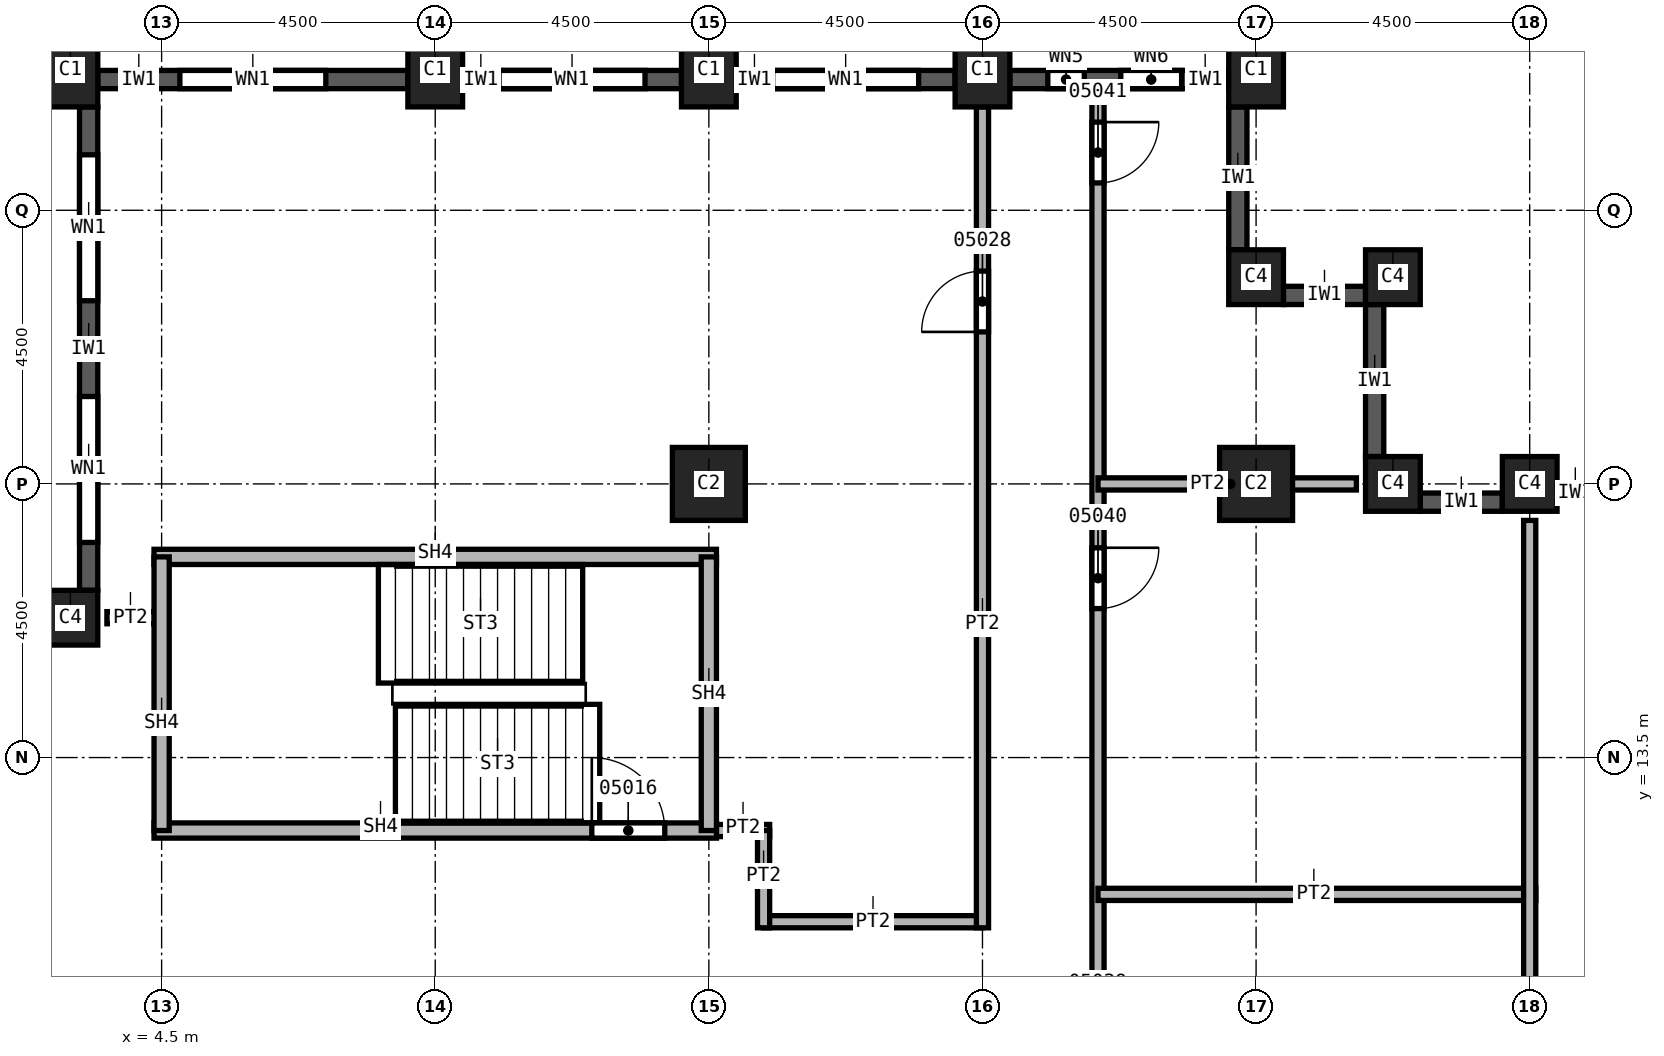
"""IFC4 building model, lengths in metres.
Left out: names, types, materials, properties, quantities, classifications, styles, units other than length and angle.
Written with IfcOpenShell. Run it as: python <this file> out.ifc"""

import sys

from ifc_helpers import new_model, si_unit, direction, frame, frame_2d, origin, origin_2d, place, context, subcontext, project, spatial, rectangle, extrude, element, fill, save


model = new_model("IFC4")
c1 = context("Model", 3, precision=1e-05, world=origin(), true_north=direction((0.0, 1.0)))
c2 = subcontext(c1, "Body", "Model", "MODEL_VIEW")
j1 = project(units=[si_unit("LENGTHUNIT", "METRE"), si_unit("PLANEANGLEUNIT", "RADIAN")], contexts=[c1])
p1 = place(None, origin())
s1 = spatial("IfcSite", under=j1, at=p1, CompositionType="ELEMENT")
p2 = place(p1, origin())
s2 = spatial("IfcBuilding", under=s1, at=p2, CompositionType="ELEMENT")
p3 = place(p2, frame((0.0, 0.0, 112.0)))
s3 = spatial("IfcBuildingStorey", under=s2, at=p3, CompositionType="ELEMENT", Elevation=112.0)
for number, where, z_axis, x_axis in (
    (1, (13.5, 18.0, 0.0), (0.0, 0.0, 1.0), (1.0, 0.0, 0.0)),
    (2, (22.5, 18.0, 0.0), (0.0, 0.0, 1.0), (1.0, 0.0, 0.0)),
):
    element("IfcColumn", number, at=place(p3, frame(where, z_axis=z_axis, x_axis=x_axis)), inside=s3, PredefinedType="COLUMN", context=c2, shape_type="SweptSolid", body=[
        extrude(rectangle(XDim=1.2, YDim=1.2, at=origin_2d()), origin(), (0.0, 0.0, 1.0), 3.7),
    ])
p4 = place(p3, frame((27.0, 18.0, 0.0), z_axis=(0.0, 0.0, 1.0), x_axis=(1.0, 0.0, 0.0)))
e3 = element("IfcColumn", 3, at=p4, inside=s3, PredefinedType="COLUMN", context=c2, shape_type="SweptSolid", body=[
    extrude(rectangle(XDim=0.9, YDim=0.9, at=origin_2d()), origin(), (0.0, 0.0, 1.0), 3.7),
])
for number, where, z_axis, x_axis in (
    (4, (3.0, 24.8, 0.0), (0.0, 0.0, 1.0), (1.0, 0.0, 0.0)),
    (5, (9.0, 24.8, 0.0), (0.0, 0.0, 1.0), (1.0, 0.0, 0.0)),
    (6, (13.5, 24.8, 0.0), (0.0, 0.0, 1.0), (1.0, 0.0, 0.0)),
    (7, (18.0, 24.8, 0.0), (0.0, 0.0, 1.0), (1.0, 0.0, 0.0)),
    (8, (22.5, 24.8, 0.0), (0.0, 0.0, 1.0), (1.0, 0.0, 0.0)),
):
    element("IfcColumn", number, at=place(p3, frame(where, z_axis=z_axis, x_axis=x_axis)), inside=s3, PredefinedType="COLUMN", context=c2, shape_type="SweptSolid", body=[
        extrude(rectangle(XDim=0.9, YDim=1.2, at=origin_2d()), origin(), (0.0, 0.0, 1.0), 3.7),
    ])
for number, where, z_axis, x_axis in (
    (9, (3.0, 15.8, 0.0), (0.0, 0.0, 1.0), (1.0, 0.0, 0.0)),
    (10, (22.5, 21.4, 0.0), (0.0, 0.0, 1.0), (1.0, 0.0, 0.0)),
    (11, (24.75, 21.4, 0.0), (0.0, 0.0, 1.0), (1.0, 0.0, 0.0)),
    (12, (24.75, 18.0, 0.0), (0.0, 0.0, 1.0), (1.0, 0.0, 0.0)),
):
    element("IfcColumn", number, at=place(p3, frame(where, z_axis=z_axis, x_axis=x_axis)), inside=s3, PredefinedType="COLUMN", context=c2, shape_type="SweptSolid", body=[
        extrude(rectangle(XDim=0.9, YDim=0.9, at=origin_2d()), origin(), (0.0, 0.0, 1.0), 3.7),
    ])
p5 = place(p3, frame((31.05, 17.85, 0.0), z_axis=(0.0, 0.0, 1.0), x_axis=(-1.0, 0.0, 0.0)))
e13 = element("IfcWall", 13, at=p5, inside=s3, PredefinedType="SOLIDWALL", context=c2, shape_type="SweptSolid", body=[
    extrude(rectangle(XDim=3.6, YDim=0.3, at=frame_2d((1.8, 0.0))), origin(), (0.0, 0.0, 1.0), 3.1),
])
p6 = place(p5, frame((0.6, 0.0, 0.8)))
e14 = element("IfcOpeningElement", 14, at=p6, cuts=e13, PredefinedType="OPENING", context=c2, shape_type="SweptSolid", body=[
    extrude(rectangle(XDim=2.4, YDim=1.95, at=frame_2d((1.2, 0.975))), frame((0.0, 0.15, 0.0), z_axis=(0.0, -1.0, 0.0), x_axis=(1.0, 0.0, 0.0)), (0.0, 0.0, 1.0), 0.3),
])
p7 = place(p3, frame((26.55, 17.7, 0.0), z_axis=(0.0, 0.0, 1.0), x_axis=(-1.0, 0.0, 0.0)))
e15 = element("IfcWall", 15, at=p7, inside=s3, PredefinedType="SOLIDWALL", context=c2, shape_type="SweptSolid", body=[
    extrude(rectangle(XDim=1.35, YDim=0.3, at=frame_2d((0.675, 0.0))), origin(), (0.0, 0.0, 1.0), 3.1),
])
p8 = place(p3, frame((24.45, 18.45, 0.0), z_axis=(0.0, 0.0, 1.0), x_axis=(0.0, 1.0, 0.0)))
e16 = element("IfcWall", 16, at=p8, inside=s3, PredefinedType="SOLIDWALL", context=c2, shape_type="SweptSolid", body=[
    extrude(rectangle(XDim=2.5, YDim=0.3, at=frame_2d((1.25, 0.0))), origin(), (0.0, 0.0, 1.0), 3.1),
])
p9 = place(p3, frame((24.3, 21.1, 0.0), z_axis=(0.0, 0.0, 1.0), x_axis=(-1.0, 0.0, 0.0)))
e17 = element("IfcWall", 17, at=p9, inside=s3, PredefinedType="SOLIDWALL", context=c2, shape_type="SweptSolid", body=[
    extrude(rectangle(XDim=1.35, YDim=0.3, at=frame_2d((0.675, 0.0))), origin(), (0.0, 0.0, 1.0), 3.1),
])
p10 = place(p3, frame((22.2, 21.85, 0.0), z_axis=(0.0, 0.0, 1.0), x_axis=(0.0, 1.0, 0.0)))
e18 = element("IfcWall", 18, at=p10, inside=s3, PredefinedType="SOLIDWALL", context=c2, shape_type="SweptSolid", body=[
    extrude(rectangle(XDim=2.35, YDim=0.3, at=frame_2d((1.175, 0.0))), origin(), (0.0, 0.0, 1.0), 3.1),
])
p11 = place(p3, frame((22.05, 24.65, 0.0), z_axis=(0.0, 0.0, 1.0), x_axis=(-1.0, 0.0, 0.0)))
e19 = element("IfcWall", 19, at=p11, inside=s3, PredefinedType="SOLIDWALL", context=c2, shape_type="SweptSolid", body=[
    extrude(rectangle(XDim=3.6, YDim=0.3, at=frame_2d((1.8, 0.0))), origin(), (0.0, 0.0, 1.0), 3.1),
])
p12 = place(p11, frame((0.775, 0.0, 0.8)))
e20 = element("IfcOpeningElement", 20, at=p12, cuts=e19, PredefinedType="OPENING", context=c2, shape_type="SweptSolid", body=[
    extrude(rectangle(XDim=1.0, YDim=1.95, at=frame_2d((0.5, 0.975))), frame((0.0, 0.15, 0.0), z_axis=(0.0, -1.0, 0.0), x_axis=(1.0, 0.0, 0.0)), (0.0, 0.0, 1.0), 0.3),
])
p13 = place(p11, frame((2.375, 0.0, 0.8)))
e21 = element("IfcOpeningElement", 21, at=p13, cuts=e19, PredefinedType="OPENING", context=c2, shape_type="SweptSolid", body=[
    extrude(rectangle(XDim=0.6, YDim=1.95, at=frame_2d((0.3, 0.975))), frame((0.0, 0.15, 0.0), z_axis=(0.0, -1.0, 0.0), x_axis=(1.0, 0.0, 0.0)), (0.0, 0.0, 1.0), 0.3),
])
p14 = place(p3, frame((17.55, 24.65, 0.0), z_axis=(0.0, 0.0, 1.0), x_axis=(-1.0, 0.0, 0.0)))
e22 = element("IfcWall", 22, at=p14, inside=s3, PredefinedType="SOLIDWALL", context=c2, shape_type="SweptSolid", body=[
    extrude(rectangle(XDim=3.6, YDim=0.3, at=frame_2d((1.8, 0.0))), origin(), (0.0, 0.0, 1.0), 3.1),
])
p15 = place(p14, frame((0.6, 0.0, 0.8)))
e23 = element("IfcOpeningElement", 23, at=p15, cuts=e22, PredefinedType="OPENING", context=c2, shape_type="SweptSolid", body=[
    extrude(rectangle(XDim=2.4, YDim=1.95, at=frame_2d((1.2, 0.975))), frame((0.0, 0.15, 0.0), z_axis=(0.0, -1.0, 0.0), x_axis=(1.0, 0.0, 0.0)), (0.0, 0.0, 1.0), 0.3),
])
p16 = place(p3, frame((13.05, 24.65, 0.0), z_axis=(0.0, 0.0, 1.0), x_axis=(-1.0, 0.0, 0.0)))
e24 = element("IfcWall", 24, at=p16, inside=s3, PredefinedType="SOLIDWALL", context=c2, shape_type="SweptSolid", body=[
    extrude(rectangle(XDim=3.6, YDim=0.3, at=frame_2d((1.8, 0.0))), origin(), (0.0, 0.0, 1.0), 3.1),
])
p17 = place(p16, frame((0.6, 0.0, 0.8)))
e25 = element("IfcOpeningElement", 25, at=p17, cuts=e24, PredefinedType="OPENING", context=c2, shape_type="SweptSolid", body=[
    extrude(rectangle(XDim=2.4, YDim=1.95, at=frame_2d((1.2, 0.975))), frame((0.0, 0.15, 0.0), z_axis=(0.0, -1.0, 0.0), x_axis=(1.0, 0.0, 0.0)), (0.0, 0.0, 1.0), 0.3),
])
p18 = place(p3, frame((8.55, 24.65, 0.0), z_axis=(0.0, 0.0, 1.0), x_axis=(-1.0, 0.0, 0.0)))
e26 = element("IfcWall", 26, at=p18, inside=s3, PredefinedType="SOLIDWALL", context=c2, shape_type="SweptSolid", body=[
    extrude(rectangle(XDim=5.1, YDim=0.3, at=frame_2d((2.55, 0.0))), origin(), (0.0, 0.0, 1.0), 3.1),
])
p19 = place(p18, frame((1.35, 0.0, 0.8)))
e27 = element("IfcOpeningElement", 27, at=p19, cuts=e26, PredefinedType="OPENING", context=c2, shape_type="SweptSolid", body=[
    extrude(rectangle(XDim=2.4, YDim=1.95, at=frame_2d((1.2, 0.975))), frame((0.0, 0.15, 0.0), z_axis=(0.0, -1.0, 0.0), x_axis=(1.0, 0.0, 0.0)), (0.0, 0.0, 1.0), 0.3),
])
p20 = place(p3, frame((3.3, 24.2, 0.0), z_axis=(0.0, 0.0, 1.0), x_axis=(0.0, -1.0, 0.0)))
e28 = element("IfcWall", 28, at=p20, inside=s3, PredefinedType="SOLIDWALL", context=c2, shape_type="SweptSolid", body=[
    extrude(rectangle(XDim=7.95, YDim=0.3, at=frame_2d((3.975, 0.0))), origin(), (0.0, 0.0, 1.0), 3.1),
])
p21 = place(p20, frame((0.788, 0.0, 0.8)))
e29 = element("IfcOpeningElement", 29, at=p21, cuts=e28, PredefinedType="OPENING", context=c2, shape_type="SweptSolid", body=[
    extrude(rectangle(XDim=2.4, YDim=1.95, at=frame_2d((1.2, 0.975))), frame((0.0, 0.15, 0.0), z_axis=(0.0, -1.0, 0.0), x_axis=(1.0, 0.0, 0.0)), (0.0, 0.0, 1.0), 0.3),
])
p22 = place(p20, frame((4.762, 0.0, 0.8)))
e30 = element("IfcOpeningElement", 30, at=p22, cuts=e28, PredefinedType="OPENING", context=c2, shape_type="SweptSolid", body=[
    extrude(rectangle(XDim=2.4, YDim=1.95, at=frame_2d((1.2, 0.975))), frame((0.0, 0.15, 0.0), z_axis=(0.0, -1.0, 0.0), x_axis=(1.0, 0.0, 0.0)), (0.0, 0.0, 1.0), 0.3),
])
p23 = place(p3, frame((3.6, 15.8, 0.0), z_axis=(0.0, 0.0, 1.0), x_axis=(1.0, 0.0, 0.0)))
e31 = element("IfcWall", 31, at=p23, inside=s3, PredefinedType="PARTITIONING", context=c2, shape_type="SweptSolid", body=[
    extrude(rectangle(XDim=0.9, YDim=0.2, at=frame_2d((0.45, 0.0))), origin(), (0.0, 0.0, 1.0), 3.7),
])
p24 = place(p3, frame((13.375, 12.3, 0.0), z_axis=(0.0, 0.0, 1.0), x_axis=(1.0, 0.0, 0.0)))
e32 = element("IfcWall", 32, at=p24, inside=s3, PredefinedType="PARTITIONING", context=c2, shape_type="SweptSolid", body=[
    extrude(rectangle(XDim=1.125, YDim=0.2, at=frame_2d((0.562, 0.0))), origin(), (0.0, 0.0, 1.0), 3.7),
])
p25 = place(p3, frame((14.4, 10.8, 0.0), z_axis=(0.0, 0.0, 1.0), x_axis=(1.0, 0.0, 0.0)))
e33 = element("IfcWall", 33, at=p25, inside=s3, PredefinedType="PARTITIONING", context=c2, shape_type="SweptSolid", body=[
    extrude(rectangle(XDim=3.6, YDim=0.2, at=frame_2d((1.8, 0.0))), origin(), (0.0, 0.0, 1.0), 3.7),
])
p26 = place(p3, frame((14.4, 12.3, 0.0), z_axis=(0.0, 0.0, 1.0), x_axis=(0.0, -1.0, 0.0)))
e34 = element("IfcWall", 34, at=p26, inside=s3, PredefinedType="PARTITIONING", context=c2, shape_type="SweptSolid", body=[
    extrude(rectangle(XDim=1.6, YDim=0.2, at=frame_2d((0.8, 0.0))), origin(), (0.0, 0.0, 1.0), 3.7),
])
p27 = place(p3, frame((18.0, 10.7, 0.0), z_axis=(0.0, 0.0, 1.0), x_axis=(0.0, 1.0, 0.0)))
e35 = element("IfcWall", 35, at=p27, inside=s3, PredefinedType="PARTITIONING", context=c2, shape_type="SweptSolid", body=[
    extrude(rectangle(XDim=13.5, YDim=0.2, at=frame_2d((6.75, 0.0))), origin(), (0.0, 0.0, 1.0), 3.7),
])
p28 = place(p27, frame((9.8, 0.0, 0.0)))
e36 = element("IfcOpeningElement", 36, at=p28, cuts=e35, PredefinedType="OPENING", context=c2, shape_type="SweptSolid", body=[
    extrude(rectangle(XDim=1.0, YDim=2.1, at=frame_2d((0.5, 1.05))), frame((0.0, 0.1, 0.0), z_axis=(0.0, -1.0, 0.0), x_axis=(1.0, 0.0, 0.0)), (0.0, 0.0, 1.0), 0.2),
])
p29 = place(p3, frame((19.9, 24.5, 0.0), z_axis=(0.0, 0.0, 1.0), x_axis=(0.0, -1.0, 0.0)))
e37 = element("IfcWall", 37, at=p29, inside=s3, PredefinedType="PARTITIONING", context=c2, shape_type="SweptSolid", body=[
    extrude(rectangle(XDim=25.35, YDim=0.2, at=frame_2d((12.675, 0.0))), origin(), (0.0, 0.0, 1.0), 3.7),
])
p30 = place(p29, frame((15.2, 0.0, 0.0)))
e38 = element("IfcOpeningElement", 38, at=p30, cuts=e37, PredefinedType="OPENING", context=c2, shape_type="SweptSolid", body=[
    extrude(rectangle(XDim=1.0, YDim=2.1, at=frame_2d((0.5, 1.05))), frame((0.0, 0.1, 0.0), z_axis=(0.0, -1.0, 0.0), x_axis=(1.0, 0.0, 0.0)), (0.0, 0.0, 1.0), 0.2),
])
p31 = place(p29, frame((7.55, 0.0, 0.0)))
e39 = element("IfcOpeningElement", 39, at=p31, cuts=e37, PredefinedType="OPENING", context=c2, shape_type="SweptSolid", body=[
    extrude(rectangle(XDim=1.0, YDim=2.1, at=frame_2d((0.5, 1.05))), frame((0.0, 0.1, 0.0), z_axis=(0.0, -1.0, 0.0), x_axis=(1.0, 0.0, 0.0)), (0.0, 0.0, 1.0), 0.2),
])
p32 = place(p29, frame((0.55, 0.0, 0.0)))
e40 = element("IfcOpeningElement", 40, at=p32, cuts=e37, PredefinedType="OPENING", context=c2, shape_type="SweptSolid", body=[
    extrude(rectangle(XDim=1.0, YDim=2.1, at=frame_2d((0.5, 1.05))), frame((0.0, 0.1, 0.0), z_axis=(0.0, -1.0, 0.0), x_axis=(1.0, 0.0, 0.0)), (0.0, 0.0, 1.0), 0.2),
])
p33 = place(p3, frame((19.9, 11.25, 0.0), z_axis=(0.0, 0.0, 1.0), x_axis=(1.0, 0.0, 0.0)))
e41 = element("IfcWall", 41, at=p33, inside=s3, PredefinedType="PARTITIONING", context=c2, shape_type="SweptSolid", body=[
    extrude(rectangle(XDim=7.2, YDim=0.2, at=frame_2d((3.6, 0.0))), origin(), (0.0, 0.0, 1.0), 3.7),
])
p34 = place(p3, frame((19.9, 18.0, 0.0), z_axis=(0.0, 0.0, 1.0), x_axis=(1.0, 0.0, 0.0)))
e42 = element("IfcWall", 42, at=p34, inside=s3, PredefinedType="PARTITIONING", context=c2, shape_type="SweptSolid", body=[
    extrude(rectangle(XDim=4.25, YDim=0.2, at=frame_2d((2.125, 0.0))), origin(), (0.0, 0.0, 1.0), 3.7),
])
p35 = place(p3, frame((27.0, 17.4, 0.0), z_axis=(0.0, 0.0, 1.0), x_axis=(0.0, -1.0, 0.0)))
e43 = element("IfcWall", 43, at=p35, inside=s3, PredefinedType="PARTITIONING", context=c2, shape_type="SweptSolid", body=[
    extrude(rectangle(XDim=18.15, YDim=0.2, at=frame_2d((9.075, 0.0))), origin(), (0.0, 0.0, 1.0), 3.7),
])
p36 = place(p3, frame((4.375, 12.3, 0.0), z_axis=(0.0, 0.0, 1.0), x_axis=(1.0, 0.0, 0.0)))
e44 = element("IfcWall", 44, at=p36, inside=s3, PredefinedType="SOLIDWALL", context=c2, shape_type="SweptSolid", body=[
    extrude(rectangle(XDim=9.25, YDim=0.25, at=frame_2d((4.625, 0.0))), origin(), (0.0, 0.0, 1.0), 3.7),
])
p37 = place(p36, frame((7.2, 0.0, 0.0)))
e45 = element("IfcOpeningElement", 45, at=p37, cuts=e44, PredefinedType="OPENING", context=c2, shape_type="SweptSolid", body=[
    extrude(rectangle(XDim=1.2, YDim=2.1, at=frame_2d((0.6, 1.05))), frame((0.0, 0.125, 0.0), z_axis=(0.0, -1.0, 0.0), x_axis=(1.0, 0.0, 0.0)), (0.0, 0.0, 1.0), 0.25),
])
p38 = place(p3, frame((4.375, 16.8, 0.0), z_axis=(0.0, 0.0, 1.0), x_axis=(1.0, 0.0, 0.0)))
e46 = element("IfcWall", 46, at=p38, inside=s3, PredefinedType="SOLIDWALL", context=c2, shape_type="SweptSolid", body=[
    extrude(rectangle(XDim=9.25, YDim=0.25, at=frame_2d((4.625, 0.0))), origin(), (0.0, 0.0, 1.0), 3.7),
])
for number, where, z_axis, x_axis in (
    (47, (4.5, 12.3, 0.0), (0.0, 0.0, 1.0), (0.0, 1.0, 0.0)),
    (48, (13.5, 16.8, 0.0), (0.0, 0.0, 1.0), (0.0, -1.0, 0.0)),
):
    element("IfcWall", number, at=place(p3, frame(where, z_axis=z_axis, x_axis=x_axis)), inside=s3, PredefinedType="SOLIDWALL", context=c2, shape_type="SweptSolid", body=[
        extrude(rectangle(XDim=4.5, YDim=0.25, at=frame_2d((2.25, 0.0))), origin(), (0.0, 0.0, 1.0), 3.7),
    ])
p39 = place(p15, origin())
e49 = element("IfcWindow", 49, at=p39, inside=s3, PartitioningType="SINGLE_PANEL", PredefinedType="WINDOW", context=c2, shape_type="SweptSolid", body=[
    extrude(rectangle(XDim=2.4, YDim=1.95, at=frame_2d((1.2, 0.975))), frame((0.0, 0.03, 0.0), z_axis=(0.0, -1.0, 0.0), x_axis=(1.0, 0.0, 0.0)), (0.0, 0.0, 1.0), 0.06),
])
fill(e23, e49)
p40 = place(p17, origin())
e50 = element("IfcWindow", 50, at=p40, inside=s3, PartitioningType="SINGLE_PANEL", PredefinedType="WINDOW", context=c2, shape_type="SweptSolid", body=[
    extrude(rectangle(XDim=2.4, YDim=1.95, at=frame_2d((1.2, 0.975))), frame((0.0, 0.03, 0.0), z_axis=(0.0, -1.0, 0.0), x_axis=(1.0, 0.0, 0.0)), (0.0, 0.0, 1.0), 0.06),
])
fill(e25, e50)
p41 = place(p19, origin())
e51 = element("IfcWindow", 51, at=p41, inside=s3, PartitioningType="SINGLE_PANEL", PredefinedType="WINDOW", context=c2, shape_type="SweptSolid", body=[
    extrude(rectangle(XDim=2.4, YDim=1.95, at=frame_2d((1.2, 0.975))), frame((0.0, 0.03, 0.0), z_axis=(0.0, -1.0, 0.0), x_axis=(1.0, 0.0, 0.0)), (0.0, 0.0, 1.0), 0.06),
])
fill(e27, e51)
p42 = place(p21, origin())
e52 = element("IfcWindow", 52, at=p42, inside=s3, PartitioningType="SINGLE_PANEL", PredefinedType="WINDOW", context=c2, shape_type="SweptSolid", body=[
    extrude(rectangle(XDim=2.4, YDim=1.95, at=frame_2d((1.2, 0.975))), frame((0.0, 0.03, 0.0), z_axis=(0.0, -1.0, 0.0), x_axis=(1.0, 0.0, 0.0)), (0.0, 0.0, 1.0), 0.06),
])
fill(e29, e52)
p43 = place(p22, origin())
e53 = element("IfcWindow", 53, at=p43, inside=s3, PartitioningType="SINGLE_PANEL", PredefinedType="WINDOW", context=c2, shape_type="SweptSolid", body=[
    extrude(rectangle(XDim=2.4, YDim=1.95, at=frame_2d((1.2, 0.975))), frame((0.0, 0.03, 0.0), z_axis=(0.0, -1.0, 0.0), x_axis=(1.0, 0.0, 0.0)), (0.0, 0.0, 1.0), 0.06),
])
fill(e30, e53)
p44 = place(p37, origin())
e54 = element("IfcDoor", 54, at=p44, inside=s3, OperationType="SINGLE_SWING_LEFT", PredefinedType="DOOR", context=c2, shape_type="SweptSolid", body=[
    extrude(rectangle(XDim=1.2, YDim=2.1, at=frame_2d((0.6, 1.05))), frame((0.0, 0.025, 0.0), z_axis=(0.0, -1.0, 0.0), x_axis=(1.0, 0.0, 0.0)), (0.0, 0.0, 1.0), 0.05),
])
fill(e45, e54)
p45 = place(p28, origin())
e55 = element("IfcDoor", 55, at=p45, inside=s3, OperationType="SINGLE_SWING_LEFT", PredefinedType="DOOR", context=c2, shape_type="SweptSolid", body=[
    extrude(rectangle(XDim=1.0, YDim=2.1, at=frame_2d((0.5, 1.05))), frame((0.0, 0.025, 0.0), z_axis=(0.0, -1.0, 0.0), x_axis=(1.0, 0.0, 0.0)), (0.0, 0.0, 1.0), 0.05),
])
fill(e36, e55)
p46 = place(p31, origin())
e56 = element("IfcDoor", 56, at=p46, inside=s3, OperationType="SINGLE_SWING_LEFT", PredefinedType="DOOR", context=c2, shape_type="SweptSolid", body=[
    extrude(rectangle(XDim=1.0, YDim=2.1, at=frame_2d((0.5, 1.05))), frame((0.0, 0.025, 0.0), z_axis=(0.0, -1.0, 0.0), x_axis=(1.0, 0.0, 0.0)), (0.0, 0.0, 1.0), 0.05),
])
fill(e39, e56)
p47 = place(p32, origin())
e57 = element("IfcDoor", 57, at=p47, inside=s3, OperationType="SINGLE_SWING_RIGHT", PredefinedType="DOOR", context=c2, shape_type="SweptSolid", body=[
    extrude(rectangle(XDim=1.0, YDim=2.1, at=frame_2d((0.5, 1.05))), frame((0.0, 0.025, 0.0), z_axis=(0.0, -1.0, 0.0), x_axis=(1.0, 0.0, 0.0)), (0.0, 0.0, 1.0), 0.05),
])
fill(e40, e57)
p48 = place(p12, origin())
e58 = element("IfcWindow", 58, at=p48, inside=s3, PartitioningType="SINGLE_PANEL", PredefinedType="WINDOW", context=c2, shape_type="SweptSolid", body=[
    extrude(rectangle(XDim=1.0, YDim=1.95, at=frame_2d((0.5, 0.975))), frame((0.0, 0.03, 0.0), z_axis=(0.0, -1.0, 0.0), x_axis=(1.0, 0.0, 0.0)), (0.0, 0.0, 1.0), 0.06),
])
fill(e20, e58)
p49 = place(p13, origin())
e59 = element("IfcWindow", 59, at=p49, inside=s3, PartitioningType="SINGLE_PANEL", PredefinedType="WINDOW", context=c2, shape_type="SweptSolid", body=[
    extrude(rectangle(XDim=0.6, YDim=1.95, at=frame_2d((0.3, 0.975))), frame((0.0, 0.03, 0.0), z_axis=(0.0, -1.0, 0.0), x_axis=(1.0, 0.0, 0.0)), (0.0, 0.0, 1.0), 0.06),
])
fill(e21, e59)
save(model, sys.argv[1])
